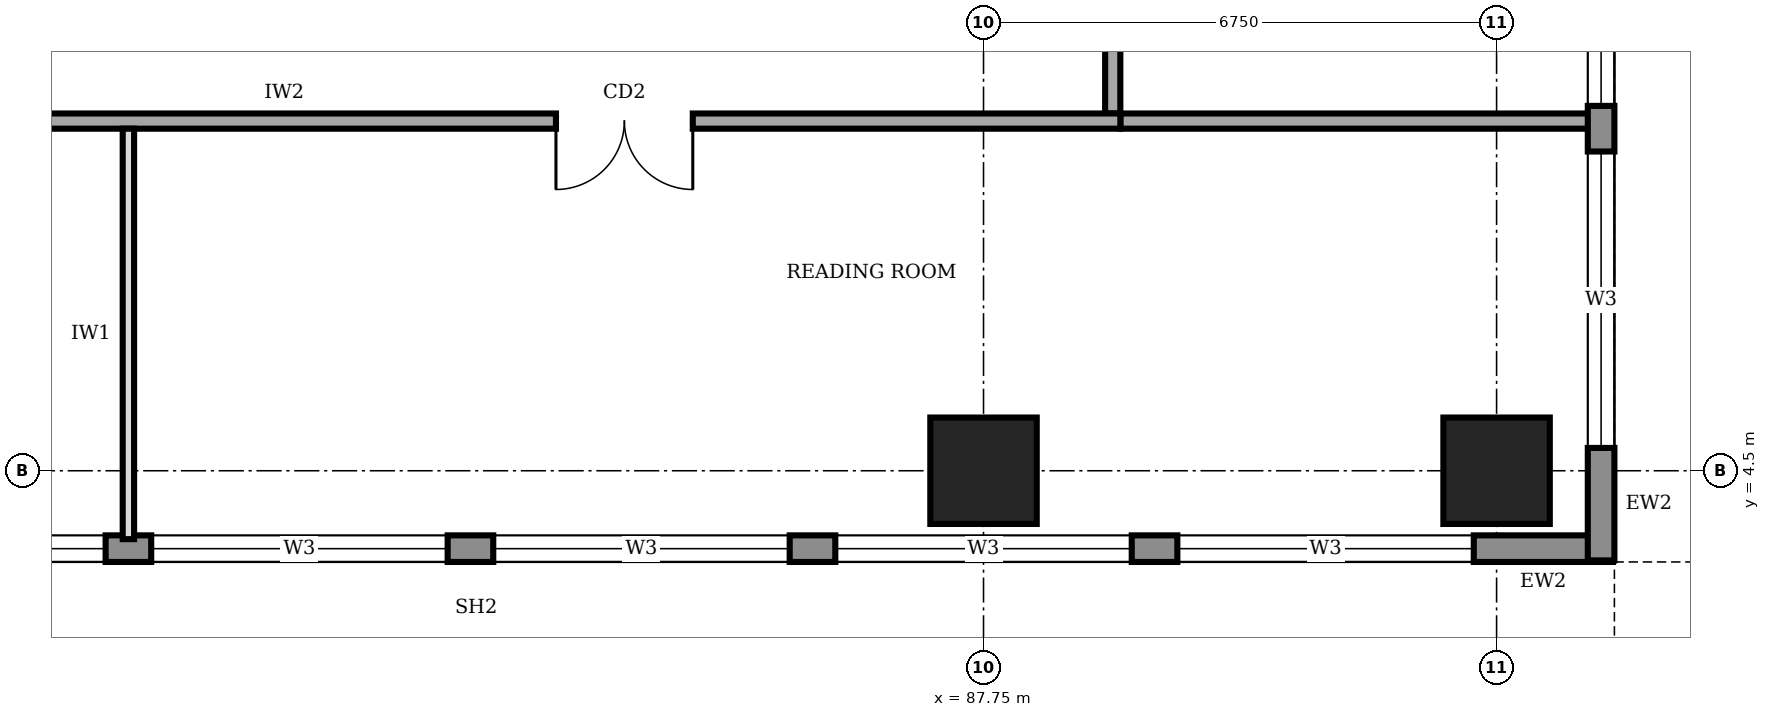
"""IFC4 building model, lengths in metres.
Left out: names, types, materials, properties, quantities, classifications, styles, units other than length and angle.
Written with IfcOpenShell. Run it as: python <this file> out.ifc"""

import sys

from ifc_helpers import new_model, si_unit, direction, frame, frame_2d, origin, origin_2d, place, context, subcontext, project, spatial, rectangle, extrude, element, fill, save


model = new_model("IFC4")
c1 = context("Model", 3, precision=1e-05, world=origin(), true_north=direction((0.0, 1.0)))
c2 = subcontext(c1, "Body", "Model", "MODEL_VIEW")
j1 = project(units=[si_unit("LENGTHUNIT", "METRE"), si_unit("PLANEANGLEUNIT", "RADIAN")], contexts=[c1])
p1 = place(None, origin())
s1 = spatial("IfcSite", under=j1, at=p1, CompositionType="ELEMENT")
p2 = place(p1, origin())
s2 = spatial("IfcBuilding", under=s1, at=p2, CompositionType="ELEMENT")
p3 = place(p2, frame((0.0, 0.0, 181.0)))
s3 = spatial("IfcBuildingStorey", under=s2, at=p3, CompositionType="ELEMENT", Elevation=181.0)
for number, where, z_axis, x_axis in (
    (1, (87.75, 4.5, 0.0), (0.0, 0.0, 1.0), (1.0, 0.0, 0.0)),
    (2, (94.5, 4.5, 0.0), (0.0, 0.0, 1.0), (1.0, 0.0, 0.0)),
):
    element("IfcColumn", number, at=place(p3, frame(where, z_axis=z_axis, x_axis=x_axis)), inside=s3, PredefinedType="COLUMN", context=c2, shape_type="SweptSolid", body=[
        extrude(rectangle(XDim=1.4, YDim=1.4, at=origin_2d()), origin(), (0.0, 0.0, 1.0), 4.0),
    ])
p4 = place(p3, frame((66.12, 3.475, 0.0), z_axis=(0.0, 0.0, 1.0), x_axis=(1.0, 0.0, 0.0)))
e3 = element("IfcWall", 3, at=p4, inside=s3, PredefinedType="STANDARD", context=c2, shape_type="SweptSolid", body=[
    extrude(rectangle(XDim=29.91, YDim=0.35, at=frame_2d((14.955, 0.0))), origin(), (0.0, 0.0, 1.0), 3.75),
])
p5 = place(p4, frame((1.68, 0.0, 0.95)))
e4 = element("IfcOpeningElement", 4, at=p5, cuts=e3, PredefinedType="OPENING", context=c2, shape_type="SweptSolid", body=[
    extrude(rectangle(XDim=3.9, YDim=1.8, at=frame_2d((1.95, 0.9))), frame((0.0, 0.185, 0.0), z_axis=(0.0, -1.0, 0.0), x_axis=(1.0, 0.0, 0.0)), (0.0, 0.0, 1.0), 0.37),
])
p6 = place(p4, frame((6.18, 0.0, 0.95)))
e5 = element("IfcOpeningElement", 5, at=p6, cuts=e3, PredefinedType="OPENING", context=c2, shape_type="SweptSolid", body=[
    extrude(rectangle(XDim=3.9, YDim=1.8, at=frame_2d((1.95, 0.9))), frame((0.0, 0.185, 0.0), z_axis=(0.0, -1.0, 0.0), x_axis=(1.0, 0.0, 0.0)), (0.0, 0.0, 1.0), 0.37),
])
p7 = place(p4, frame((10.68, 0.0, 0.95)))
e6 = element("IfcOpeningElement", 6, at=p7, cuts=e3, PredefinedType="OPENING", context=c2, shape_type="SweptSolid", body=[
    extrude(rectangle(XDim=3.9, YDim=1.8, at=frame_2d((1.95, 0.9))), frame((0.0, 0.185, 0.0), z_axis=(0.0, -1.0, 0.0), x_axis=(1.0, 0.0, 0.0)), (0.0, 0.0, 1.0), 0.37),
])
p8 = place(p4, frame((15.18, 0.0, 0.95)))
e7 = element("IfcOpeningElement", 7, at=p8, cuts=e3, PredefinedType="OPENING", context=c2, shape_type="SweptSolid", body=[
    extrude(rectangle(XDim=3.9, YDim=1.8, at=frame_2d((1.95, 0.9))), frame((0.0, 0.185, 0.0), z_axis=(0.0, -1.0, 0.0), x_axis=(1.0, 0.0, 0.0)), (0.0, 0.0, 1.0), 0.37),
])
p9 = place(p4, frame((19.68, 0.0, 0.95)))
e8 = element("IfcOpeningElement", 8, at=p9, cuts=e3, PredefinedType="OPENING", context=c2, shape_type="SweptSolid", body=[
    extrude(rectangle(XDim=3.9, YDim=1.8, at=frame_2d((1.95, 0.9))), frame((0.0, 0.185, 0.0), z_axis=(0.0, -1.0, 0.0), x_axis=(1.0, 0.0, 0.0)), (0.0, 0.0, 1.0), 0.37),
])
p10 = place(p4, frame((24.18, 0.0, 0.95)))
e9 = element("IfcOpeningElement", 9, at=p10, cuts=e3, PredefinedType="OPENING", context=c2, shape_type="SweptSolid", body=[
    extrude(rectangle(XDim=3.9, YDim=1.8, at=frame_2d((1.95, 0.9))), frame((0.0, 0.185, 0.0), z_axis=(0.0, -1.0, 0.0), x_axis=(1.0, 0.0, 0.0)), (0.0, 0.0, 1.0), 0.37),
])
p11 = place(p3, frame((95.875, 3.32, 0.0), z_axis=(0.0, 0.0, 1.0), x_axis=(0.0, 1.0, 0.0)))
e10 = element("IfcWall", 10, at=p11, inside=s3, PredefinedType="STANDARD", context=c2, shape_type="SweptSolid", body=[
    extrude(rectangle(XDim=33.86, YDim=0.35, at=frame_2d((16.93, 0.0))), origin(), (0.0, 0.0, 1.0), 3.75),
])
p12 = place(p11, frame((1.48, 0.0, 0.95)))
e11 = element("IfcOpeningElement", 11, at=p12, cuts=e10, PredefinedType="OPENING", context=c2, shape_type="SweptSolid", body=[
    extrude(rectangle(XDim=3.9, YDim=1.8, at=frame_2d((1.95, 0.9))), frame((0.0, 0.185, 0.0), z_axis=(0.0, -1.0, 0.0), x_axis=(1.0, 0.0, 0.0)), (0.0, 0.0, 1.0), 0.37),
])
p13 = place(p11, frame((5.98, 0.0, 0.95)))
e12 = element("IfcOpeningElement", 12, at=p13, cuts=e10, PredefinedType="OPENING", context=c2, shape_type="SweptSolid", body=[
    extrude(rectangle(XDim=3.9, YDim=1.8, at=frame_2d((1.95, 0.9))), frame((0.0, 0.185, 0.0), z_axis=(0.0, -1.0, 0.0), x_axis=(1.0, 0.0, 0.0)), (0.0, 0.0, 1.0), 0.37),
])
p14 = place(p11, frame((10.48, 0.0, 0.95)))
e13 = element("IfcOpeningElement", 13, at=p14, cuts=e10, PredefinedType="OPENING", context=c2, shape_type="SweptSolid", body=[
    extrude(rectangle(XDim=3.9, YDim=1.8, at=frame_2d((1.95, 0.9))), frame((0.0, 0.185, 0.0), z_axis=(0.0, -1.0, 0.0), x_axis=(1.0, 0.0, 0.0)), (0.0, 0.0, 1.0), 0.37),
])
p15 = place(p11, frame((14.98, 0.0, 0.95)))
e14 = element("IfcOpeningElement", 14, at=p15, cuts=e10, PredefinedType="OPENING", context=c2, shape_type="SweptSolid", body=[
    extrude(rectangle(XDim=3.9, YDim=1.8, at=frame_2d((1.95, 0.9))), frame((0.0, 0.185, 0.0), z_axis=(0.0, -1.0, 0.0), x_axis=(1.0, 0.0, 0.0)), (0.0, 0.0, 1.0), 0.37),
])
p16 = place(p11, frame((19.48, 0.0, 0.95)))
e15 = element("IfcOpeningElement", 15, at=p16, cuts=e10, PredefinedType="OPENING", context=c2, shape_type="SweptSolid", body=[
    extrude(rectangle(XDim=3.9, YDim=1.8, at=frame_2d((1.95, 0.9))), frame((0.0, 0.185, 0.0), z_axis=(0.0, -1.0, 0.0), x_axis=(1.0, 0.0, 0.0)), (0.0, 0.0, 1.0), 0.37),
])
p17 = place(p11, frame((23.98, 0.0, 0.95)))
e16 = element("IfcOpeningElement", 16, at=p17, cuts=e10, PredefinedType="OPENING", context=c2, shape_type="SweptSolid", body=[
    extrude(rectangle(XDim=3.9, YDim=1.8, at=frame_2d((1.95, 0.9))), frame((0.0, 0.185, 0.0), z_axis=(0.0, -1.0, 0.0), x_axis=(1.0, 0.0, 0.0)), (0.0, 0.0, 1.0), 0.37),
])
p18 = place(p11, frame((28.48, 0.0, 0.95)))
e17 = element("IfcOpeningElement", 17, at=p18, cuts=e10, PredefinedType="OPENING", context=c2, shape_type="SweptSolid", body=[
    extrude(rectangle(XDim=3.9, YDim=1.8, at=frame_2d((1.95, 0.9))), frame((0.0, 0.185, 0.0), z_axis=(0.0, -1.0, 0.0), x_axis=(1.0, 0.0, 0.0)), (0.0, 0.0, 1.0), 0.37),
])
p19 = place(p3, frame((72.65, 9.1, 0.0), z_axis=(0.0, 0.0, 1.0), x_axis=(1.0, 0.0, 0.0)))
e18 = element("IfcWall", 18, at=p19, inside=s3, PredefinedType="SOLIDWALL", context=c2, shape_type="SweptSolid", body=[
    extrude(rectangle(XDim=16.9, YDim=0.2, at=frame_2d((8.45, 0.0))), origin(), (0.0, 0.0, 1.0), 3.75),
])
p20 = place(p19, frame((1.325, 0.0, 0.0)))
e19 = element("IfcOpeningElement", 19, at=p20, cuts=e18, PredefinedType="OPENING", context=c2, shape_type="SweptSolid", body=[
    extrude(rectangle(XDim=1.0, YDim=2.1, at=frame_2d((0.5, 1.05))), frame((0.0, 0.11, 0.0), z_axis=(0.0, -1.0, 0.0), x_axis=(1.0, 0.0, 0.0)), (0.0, 0.0, 1.0), 0.22),
])
p21 = place(p19, frame((9.475, 0.0, 0.0)))
e20 = element("IfcOpeningElement", 20, at=p21, cuts=e18, PredefinedType="OPENING", context=c2, shape_type="SweptSolid", body=[
    extrude(rectangle(XDim=1.8, YDim=2.1, at=frame_2d((0.9, 1.05))), frame((0.0, 0.11, 0.0), z_axis=(0.0, -1.0, 0.0), x_axis=(1.0, 0.0, 0.0)), (0.0, 0.0, 1.0), 0.22),
])
p22 = place(p3, frame((89.45, 9.2, 0.0), z_axis=(0.0, 0.0, 1.0), x_axis=(0.0, 1.0, 0.0)))
e21 = element("IfcWall", 21, at=p22, inside=s3, PredefinedType="SOLIDWALL", context=c2, shape_type="SweptSolid", body=[
    extrude(rectangle(XDim=23.05, YDim=0.2, at=frame_2d((11.525, 0.0))), origin(), (0.0, 0.0, 1.0), 3.75),
])
p23 = place(p22, frame((1.55, 0.0, 0.0)))
e22 = element("IfcOpeningElement", 22, at=p23, cuts=e21, PredefinedType="OPENING", context=c2, shape_type="SweptSolid", body=[
    extrude(rectangle(XDim=1.0, YDim=2.1, at=frame_2d((0.5, 1.05))), frame((0.0, 0.11, 0.0), z_axis=(0.0, -1.0, 0.0), x_axis=(1.0, 0.0, 0.0)), (0.0, 0.0, 1.0), 0.22),
])
p24 = place(p22, frame((5.55, 0.0, 0.0)))
e23 = element("IfcOpeningElement", 23, at=p24, cuts=e21, PredefinedType="OPENING", context=c2, shape_type="SweptSolid", body=[
    extrude(rectangle(XDim=0.9, YDim=2.1, at=frame_2d((0.45, 1.05))), frame((0.0, 0.11, 0.0), z_axis=(0.0, -1.0, 0.0), x_axis=(1.0, 0.0, 0.0)), (0.0, 0.0, 1.0), 0.22),
])
p25 = place(p22, frame((10.35, 0.0, 0.0)))
e24 = element("IfcOpeningElement", 24, at=p25, cuts=e21, PredefinedType="OPENING", context=c2, shape_type="SweptSolid", body=[
    extrude(rectangle(XDim=0.9, YDim=2.1, at=frame_2d((0.45, 1.05))), frame((0.0, 0.11, 0.0), z_axis=(0.0, -1.0, 0.0), x_axis=(1.0, 0.0, 0.0)), (0.0, 0.0, 1.0), 0.22),
])
p26 = place(p22, frame((13.4, 0.0, 0.0)))
e25 = element("IfcOpeningElement", 25, at=p26, cuts=e21, PredefinedType="OPENING", context=c2, shape_type="SweptSolid", body=[
    extrude(rectangle(XDim=0.9, YDim=2.1, at=frame_2d((0.45, 1.05))), frame((0.0, 0.11, 0.0), z_axis=(0.0, -1.0, 0.0), x_axis=(1.0, 0.0, 0.0)), (0.0, 0.0, 1.0), 0.22),
])
p27 = place(p22, frame((16.3, 0.0, 0.0)))
e26 = element("IfcOpeningElement", 26, at=p27, cuts=e21, PredefinedType="OPENING", context=c2, shape_type="SweptSolid", body=[
    extrude(rectangle(XDim=1.0, YDim=2.1, at=frame_2d((0.5, 1.05))), frame((0.0, 0.11, 0.0), z_axis=(0.0, -1.0, 0.0), x_axis=(1.0, 0.0, 0.0)), (0.0, 0.0, 1.0), 0.22),
])
p28 = place(p22, frame((8.2, 0.0, 0.0)))
e27 = element("IfcOpeningElement", 27, at=p28, cuts=e21, PredefinedType="OPENING", context=c2, shape_type="SweptSolid", body=[
    extrude(rectangle(XDim=1.0, YDim=2.1, at=frame_2d((0.5, 1.05))), frame((0.0, 0.11, 0.0), z_axis=(0.0, -1.0, 0.0), x_axis=(1.0, 0.0, 0.0)), (0.0, 0.0, 1.0), 0.22),
])
p29 = place(p22, frame((19.925, 0.0, 0.0)))
e28 = element("IfcOpeningElement", 28, at=p29, cuts=e21, PredefinedType="OPENING", context=c2, shape_type="SweptSolid", body=[
    extrude(rectangle(XDim=1.0, YDim=2.1, at=frame_2d((0.5, 1.05))), frame((0.0, 0.11, 0.0), z_axis=(0.0, -1.0, 0.0), x_axis=(1.0, 0.0, 0.0)), (0.0, 0.0, 1.0), 0.22),
])
p30 = place(p3, frame((89.55, 9.1, 0.0), z_axis=(0.0, 0.0, 1.0), x_axis=(1.0, 0.0, 0.0)))
e29 = element("IfcWall", 29, at=p30, inside=s3, PredefinedType="SOLIDWALL", context=c2, shape_type="SweptSolid", body=[
    extrude(rectangle(XDim=6.2, YDim=0.2, at=frame_2d((3.1, 0.0))), origin(), (0.0, 0.0, 1.0), 3.75),
])
p31 = place(p3, frame((76.5, 3.6, 0.0), z_axis=(0.0, 0.0, 1.0), x_axis=(0.0, 1.0, 0.0)))
e30 = element("IfcWall", 30, at=p31, inside=s3, PredefinedType="PARTITIONING", context=c2, shape_type="SweptSolid", body=[
    extrude(rectangle(XDim=5.4, YDim=0.15, at=frame_2d((2.7, 0.0))), origin(), (0.0, 0.0, 1.0), 3.75),
])
p32 = place(p6, origin())
e31 = element("IfcWindow", 31, at=p32, inside=s3, PartitioningType="SINGLE_PANEL", PredefinedType="WINDOW", context=c2, shape_type="SweptSolid", body=[
    extrude(rectangle(XDim=3.9, YDim=1.8, at=frame_2d((1.95, 0.9))), frame((0.0, 0.03, 0.0), z_axis=(0.0, -1.0, 0.0), x_axis=(1.0, 0.0, 0.0)), (0.0, 0.0, 1.0), 0.06),
])
fill(e5, e31)
p33 = place(p7, origin())
e32 = element("IfcWindow", 32, at=p33, inside=s3, PartitioningType="SINGLE_PANEL", PredefinedType="WINDOW", context=c2, shape_type="SweptSolid", body=[
    extrude(rectangle(XDim=3.9, YDim=1.8, at=frame_2d((1.95, 0.9))), frame((0.0, 0.03, 0.0), z_axis=(0.0, -1.0, 0.0), x_axis=(1.0, 0.0, 0.0)), (0.0, 0.0, 1.0), 0.06),
])
fill(e6, e32)
p34 = place(p8, origin())
e33 = element("IfcWindow", 33, at=p34, inside=s3, PartitioningType="SINGLE_PANEL", PredefinedType="WINDOW", context=c2, shape_type="SweptSolid", body=[
    extrude(rectangle(XDim=3.9, YDim=1.8, at=frame_2d((1.95, 0.9))), frame((0.0, 0.03, 0.0), z_axis=(0.0, -1.0, 0.0), x_axis=(1.0, 0.0, 0.0)), (0.0, 0.0, 1.0), 0.06),
])
fill(e7, e33)
p35 = place(p9, origin())
e34 = element("IfcWindow", 34, at=p35, inside=s3, PartitioningType="SINGLE_PANEL", PredefinedType="WINDOW", context=c2, shape_type="SweptSolid", body=[
    extrude(rectangle(XDim=3.9, YDim=1.8, at=frame_2d((1.95, 0.9))), frame((0.0, 0.03, 0.0), z_axis=(0.0, -1.0, 0.0), x_axis=(1.0, 0.0, 0.0)), (0.0, 0.0, 1.0), 0.06),
])
fill(e8, e34)
p36 = place(p10, origin())
e35 = element("IfcWindow", 35, at=p36, inside=s3, PartitioningType="SINGLE_PANEL", PredefinedType="WINDOW", context=c2, shape_type="SweptSolid", body=[
    extrude(rectangle(XDim=3.9, YDim=1.8, at=frame_2d((1.95, 0.9))), frame((0.0, 0.03, 0.0), z_axis=(0.0, -1.0, 0.0), x_axis=(1.0, 0.0, 0.0)), (0.0, 0.0, 1.0), 0.06),
])
fill(e9, e35)
p37 = place(p12, origin())
e36 = element("IfcWindow", 36, at=p37, inside=s3, PartitioningType="SINGLE_PANEL", PredefinedType="WINDOW", context=c2, shape_type="SweptSolid", body=[
    extrude(rectangle(XDim=3.9, YDim=1.8, at=frame_2d((1.95, 0.9))), frame((0.0, 0.03, 0.0), z_axis=(0.0, -1.0, 0.0), x_axis=(1.0, 0.0, 0.0)), (0.0, 0.0, 1.0), 0.06),
])
fill(e11, e36)
p38 = place(p13, origin())
e37 = element("IfcWindow", 37, at=p38, inside=s3, PartitioningType="SINGLE_PANEL", PredefinedType="WINDOW", context=c2, shape_type="SweptSolid", body=[
    extrude(rectangle(XDim=3.9, YDim=1.8, at=frame_2d((1.95, 0.9))), frame((0.0, 0.03, 0.0), z_axis=(0.0, -1.0, 0.0), x_axis=(1.0, 0.0, 0.0)), (0.0, 0.0, 1.0), 0.06),
])
fill(e12, e37)
p39 = place(p21, frame((1.8, 0.0, 0.0), z_axis=(0.0, 0.0, 1.0), x_axis=(-1.0, 0.0, 0.0)))
e38 = element("IfcDoor", 38, at=p39, inside=s3, OperationType="DOUBLE_DOOR_SINGLE_SWING", PredefinedType="DOOR", context=c2, shape_type="SweptSolid", body=[
    extrude(rectangle(XDim=1.8, YDim=2.1, at=frame_2d((0.9, 1.05))), frame((0.0, 0.025, 0.0), z_axis=(0.0, -1.0, 0.0), x_axis=(1.0, 0.0, 0.0)), (0.0, 0.0, 1.0), 0.05),
])
fill(e20, e38)
save(model, sys.argv[1])
